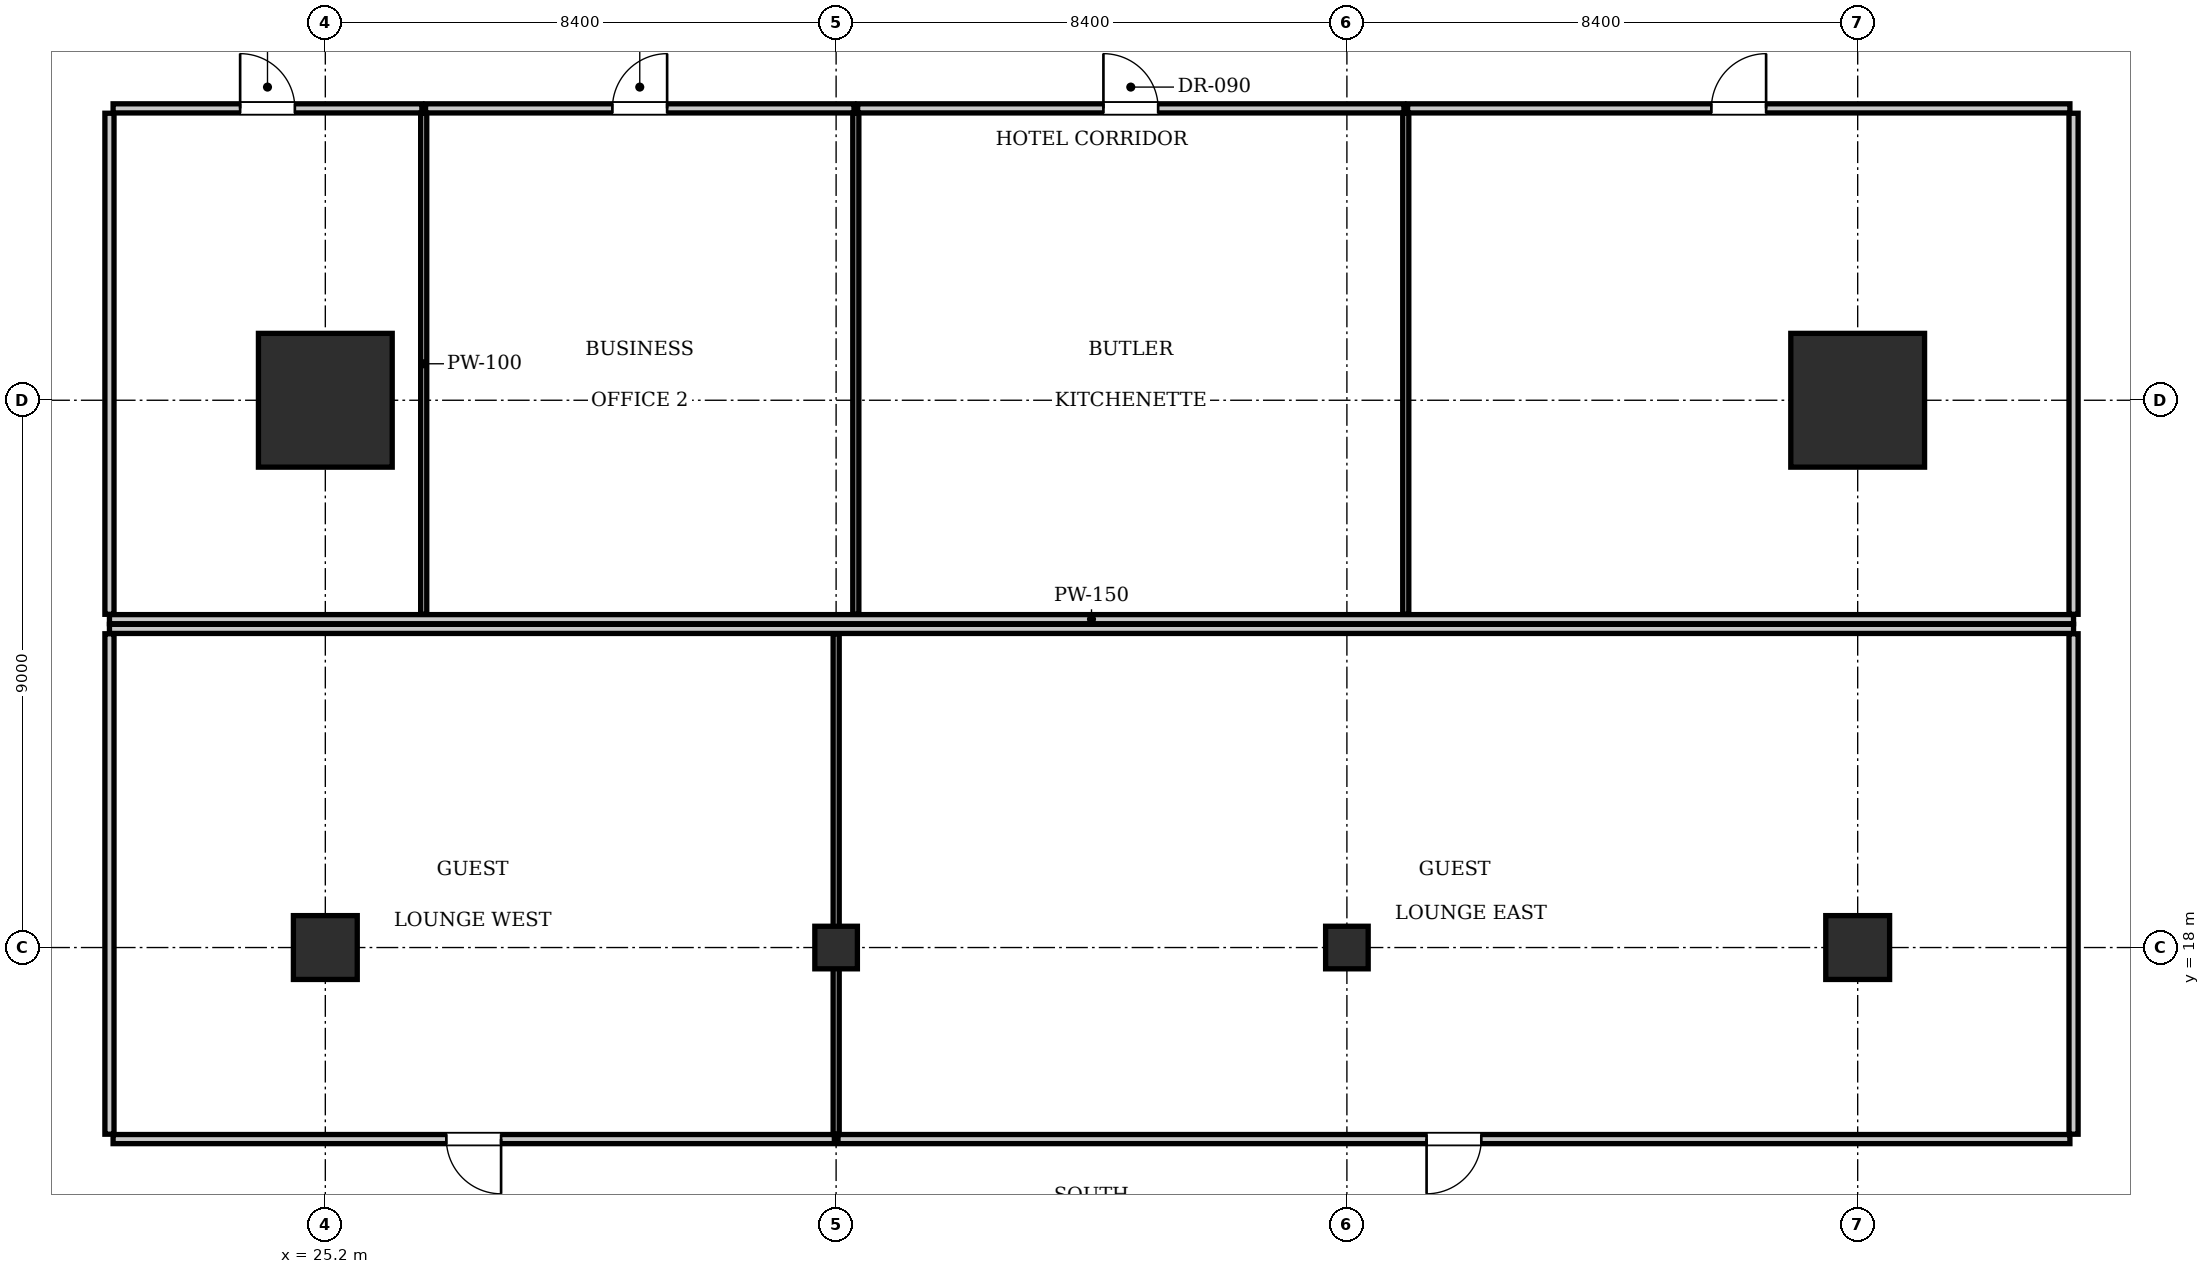
"""IFC4 building model, lengths in metres.
Left out: names, types, materials, properties, quantities, classifications, styles, units other than length and angle.
Written with IfcOpenShell. Run it as: python <this file> out.ifc"""

import sys

from ifc_helpers import new_model, si_unit, direction, frame, frame_2d, origin, origin_2d, place, context, subcontext, project, spatial, rectangle, i_section, extrude, element, fill, save


model = new_model("IFC4")
c1 = context("Model", 3, precision=1e-05, world=origin(), true_north=direction((0.0, 1.0)))
c2 = subcontext(c1, "Body", "Model", "MODEL_VIEW")
j1 = project(units=[si_unit("LENGTHUNIT", "METRE"), si_unit("PLANEANGLEUNIT", "RADIAN")], contexts=[c1])
p1 = place(None, origin())
s1 = spatial("IfcSite", under=j1, at=p1, CompositionType="ELEMENT")
p2 = place(p1, origin())
s2 = spatial("IfcBuilding", under=s1, at=p2, CompositionType="ELEMENT")
p3 = place(p2, frame((0.0, 0.0, 38.5)))
s3 = spatial("IfcBuildingStorey", under=s2, at=p3, CompositionType="ELEMENT", Elevation=38.5)
for number, where, z_axis, x_axis in (
    (1, (25.2, 27.0, 0.0), (0.0, 0.0, 1.0), (1.0, 0.0, 0.0)),
    (2, (50.4, 27.0, 0.0), (0.0, 0.0, 1.0), (1.0, 0.0, 0.0)),
):
    element("IfcColumn", number, at=place(p3, frame(where, z_axis=z_axis, x_axis=x_axis)), inside=s3, PredefinedType="COLUMN", context=c2, shape_type="SweptSolid", body=[
        extrude(rectangle(XDim=2.2, YDim=2.2, at=origin_2d()), origin(), (0.0, 0.0, 1.0), 3.85),
    ])
for number, where, z_axis, x_axis in (
    (3, (25.2, 18.0, 0.0), (0.0, 0.0, 1.0), (1.0, 0.0, 0.0)),
    (4, (50.4, 18.0, 0.0), (0.0, 0.0, 1.0), (1.0, 0.0, 0.0)),
):
    element("IfcColumn", number, at=place(p3, frame(where, z_axis=z_axis, x_axis=x_axis)), inside=s3, PredefinedType="COLUMN", context=c2, shape_type="SweptSolid", body=[
        extrude(rectangle(XDim=1.05, YDim=1.05, at=origin_2d()), origin(), (0.0, 0.0, 1.0), 3.85),
    ])
for number, where, z_axis, x_axis in (
    (5, (33.6, 18.0, 0.0), (0.0, 0.0, 1.0), (1.0, 0.0, 0.0)),
    (6, (42.0, 18.0, 0.0), (0.0, 0.0, 1.0), (1.0, 0.0, 0.0)),
):
    element("IfcColumn", number, at=place(p3, frame(where, z_axis=z_axis, x_axis=x_axis)), inside=s3, PredefinedType="COLUMN", context=c2, shape_type="SweptSolid", body=[
        extrude(i_section(OverallWidth=0.7, OverallDepth=0.7, WebThickness=0.028, FlangeThickness=0.044, at=origin_2d()), origin(), (0.0, 0.0, 1.0), 3.85),
    ])
p4 = place(p3, frame((21.65, 23.4, 0.0), z_axis=(0.0, 0.0, 1.0), x_axis=(1.0, 0.0, 0.0)))
e7 = element("IfcWall", 7, at=p4, inside=s3, PredefinedType="PARTITIONING", context=c2, shape_type="SweptSolid", body=[
    extrude(rectangle(XDim=32.3, YDim=0.15, at=frame_2d((16.15, 0.0))), origin(), (0.0, 0.0, 1.0), 3.61),
])
for number, where, z_axis, x_axis in (
    (8, (21.65, 23.48, 0.0), (0.0, 0.0, 1.0), (0.0, 1.0, 0.0)),
    (9, (53.95, 23.48, 0.0), (0.0, 0.0, 1.0), (0.0, 1.0, 0.0)),
):
    element("IfcWall", number, at=place(p3, frame(where, z_axis=z_axis, x_axis=x_axis)), inside=s3, PredefinedType="PARTITIONING", context=c2, shape_type="SweptSolid", body=[
        extrude(rectangle(XDim=8.24, YDim=0.15, at=frame_2d((4.12, 0.0))), origin(), (0.0, 0.0, 1.0), 3.61),
    ])
p5 = place(p3, frame((21.71, 31.8, 0.0), z_axis=(0.0, 0.0, 1.0), x_axis=(1.0, 0.0, 0.0)))
e10 = element("IfcWall", 10, at=p5, inside=s3, PredefinedType="PARTITIONING", context=c2, shape_type="SweptSolid", body=[
    extrude(rectangle(XDim=5.078, YDim=0.15, at=frame_2d((2.539, 0.0))), origin(), (0.0, 0.0, 1.0), 3.61),
])
p6 = place(p5, frame((2.089, 0.0, 0.0)))
e11 = element("IfcOpeningElement", 11, at=p6, cuts=e10, PredefinedType="OPENING", context=c2, shape_type="SweptSolid", body=[
    extrude(rectangle(XDim=0.9, YDim=2.1, at=frame_2d((0.45, 1.05))), frame((0.0, 0.085, 0.0), z_axis=(0.0, -1.0, 0.0), x_axis=(1.0, 0.0, 0.0)), (0.0, 0.0, 1.0), 0.17),
])
p7 = place(p3, frame((26.818, 23.48, 0.0), z_axis=(0.0, 0.0, 1.0), x_axis=(0.0, 1.0, 0.0)))
e12 = element("IfcWall", 12, at=p7, inside=s3, PredefinedType="PARTITIONING", context=c2, shape_type="SweptSolid", body=[
    extrude(rectangle(XDim=8.24, YDim=0.1, at=frame_2d((4.12, 0.0))), origin(), (0.0, 0.0, 1.0), 3.61),
])
p8 = place(p3, frame((26.848, 31.8, 0.0), z_axis=(0.0, 0.0, 1.0), x_axis=(1.0, 0.0, 0.0)))
e13 = element("IfcWall", 13, at=p8, inside=s3, PredefinedType="PARTITIONING", context=c2, shape_type="SweptSolid", body=[
    extrude(rectangle(XDim=7.046, YDim=0.15, at=frame_2d((3.523, 0.0))), origin(), (0.0, 0.0, 1.0), 3.61),
])
p9 = place(p8, frame((3.073, 0.0, 0.0)))
e14 = element("IfcOpeningElement", 14, at=p9, cuts=e13, PredefinedType="OPENING", context=c2, shape_type="SweptSolid", body=[
    extrude(rectangle(XDim=0.9, YDim=2.1, at=frame_2d((0.45, 1.05))), frame((0.0, 0.085, 0.0), z_axis=(0.0, -1.0, 0.0), x_axis=(1.0, 0.0, 0.0)), (0.0, 0.0, 1.0), 0.17),
])
p10 = place(p3, frame((33.924, 23.48, 0.0), z_axis=(0.0, 0.0, 1.0), x_axis=(0.0, 1.0, 0.0)))
e15 = element("IfcWall", 15, at=p10, inside=s3, PredefinedType="PARTITIONING", context=c2, shape_type="SweptSolid", body=[
    extrude(rectangle(XDim=8.24, YDim=0.1, at=frame_2d((4.12, 0.0))), origin(), (0.0, 0.0, 1.0), 3.61),
])
p11 = place(p3, frame((33.954, 31.8, 0.0), z_axis=(0.0, 0.0, 1.0), x_axis=(1.0, 0.0, 0.0)))
e16 = element("IfcWall", 16, at=p11, inside=s3, PredefinedType="PARTITIONING", context=c2, shape_type="SweptSolid", body=[
    extrude(rectangle(XDim=8.984, YDim=0.15, at=frame_2d((4.492, 0.0))), origin(), (0.0, 0.0, 1.0), 3.61),
])
p12 = place(p11, frame((4.042, 0.0, 0.0)))
e17 = element("IfcOpeningElement", 17, at=p12, cuts=e16, PredefinedType="OPENING", context=c2, shape_type="SweptSolid", body=[
    extrude(rectangle(XDim=0.9, YDim=2.1, at=frame_2d((0.45, 1.05))), frame((0.0, 0.085, 0.0), z_axis=(0.0, -1.0, 0.0), x_axis=(1.0, 0.0, 0.0)), (0.0, 0.0, 1.0), 0.17),
])
p13 = place(p3, frame((42.968, 23.48, 0.0), z_axis=(0.0, 0.0, 1.0), x_axis=(0.0, 1.0, 0.0)))
e18 = element("IfcWall", 18, at=p13, inside=s3, PredefinedType="PARTITIONING", context=c2, shape_type="SweptSolid", body=[
    extrude(rectangle(XDim=8.24, YDim=0.1, at=frame_2d((4.12, 0.0))), origin(), (0.0, 0.0, 1.0), 3.61),
])
p14 = place(p3, frame((42.998, 31.8, 0.0), z_axis=(0.0, 0.0, 1.0), x_axis=(1.0, 0.0, 0.0)))
e19 = element("IfcWall", 19, at=p14, inside=s3, PredefinedType="PARTITIONING", context=c2, shape_type="SweptSolid", body=[
    extrude(rectangle(XDim=10.892, YDim=0.15, at=frame_2d((5.446, 0.0))), origin(), (0.0, 0.0, 1.0), 3.61),
])
p15 = place(p14, frame((4.996, 0.0, 0.0)))
e20 = element("IfcOpeningElement", 20, at=p15, cuts=e19, PredefinedType="OPENING", context=c2, shape_type="SweptSolid", body=[
    extrude(rectangle(XDim=0.9, YDim=2.1, at=frame_2d((0.45, 1.05))), frame((0.0, 0.085, 0.0), z_axis=(0.0, -1.0, 0.0), x_axis=(1.0, 0.0, 0.0)), (0.0, 0.0, 1.0), 0.17),
])
p16 = place(p3, frame((21.65, 23.24, 0.0), z_axis=(0.0, 0.0, 1.0), x_axis=(1.0, 0.0, 0.0)))
e21 = element("IfcWall", 21, at=p16, inside=s3, PredefinedType="PARTITIONING", context=c2, shape_type="SweptSolid", body=[
    extrude(rectangle(XDim=32.3, YDim=0.15, at=frame_2d((16.15, 0.0))), origin(), (0.0, 0.0, 1.0), 3.61),
])
for number, where, z_axis, x_axis in (
    (22, (21.65, 14.93, 0.0), (0.0, 0.0, 1.0), (0.0, 1.0, 0.0)),
    (23, (53.95, 14.93, 0.0), (0.0, 0.0, 1.0), (0.0, 1.0, 0.0)),
):
    element("IfcWall", number, at=place(p3, frame(where, z_axis=z_axis, x_axis=x_axis)), inside=s3, PredefinedType="PARTITIONING", context=c2, shape_type="SweptSolid", body=[
        extrude(rectangle(XDim=8.23, YDim=0.15, at=frame_2d((4.115, 0.0))), origin(), (0.0, 0.0, 1.0), 3.61),
    ])
p17 = place(p3, frame((21.71, 14.85, 0.0), z_axis=(0.0, 0.0, 1.0), x_axis=(1.0, 0.0, 0.0)))
e24 = element("IfcWall", 24, at=p17, inside=s3, PredefinedType="PARTITIONING", context=c2, shape_type="SweptSolid", body=[
    extrude(rectangle(XDim=11.861, YDim=0.15, at=frame_2d((5.931, 0.0))), origin(), (0.0, 0.0, 1.0), 3.61),
])
p18 = place(p17, frame((5.48, 0.0, 0.0)))
e25 = element("IfcOpeningElement", 25, at=p18, cuts=e24, PredefinedType="OPENING", context=c2, shape_type="SweptSolid", body=[
    extrude(rectangle(XDim=0.9, YDim=2.1, at=frame_2d((0.45, 1.05))), frame((0.0, 0.085, 0.0), z_axis=(0.0, -1.0, 0.0), x_axis=(1.0, 0.0, 0.0)), (0.0, 0.0, 1.0), 0.17),
])
p19 = place(p3, frame((33.601, 14.93, 0.0), z_axis=(0.0, 0.0, 1.0), x_axis=(0.0, 1.0, 0.0)))
e26 = element("IfcWall", 26, at=p19, inside=s3, PredefinedType="PARTITIONING", context=c2, shape_type="SweptSolid", body=[
    extrude(rectangle(XDim=8.23, YDim=0.1, at=frame_2d((4.115, 0.0))), origin(), (0.0, 0.0, 1.0), 2.988),
])
p20 = place(p3, frame((33.631, 14.85, 0.0), z_axis=(0.0, 0.0, 1.0), x_axis=(1.0, 0.0, 0.0)))
e27 = element("IfcWall", 27, at=p20, inside=s3, PredefinedType="PARTITIONING", context=c2, shape_type="SweptSolid", body=[
    extrude(rectangle(XDim=20.259, YDim=0.15, at=frame_2d((10.129, 0.0))), origin(), (0.0, 0.0, 1.0), 3.61),
])
p21 = place(p20, frame((9.679, 0.0, 0.0)))
e28 = element("IfcOpeningElement", 28, at=p21, cuts=e27, PredefinedType="OPENING", context=c2, shape_type="SweptSolid", body=[
    extrude(rectangle(XDim=0.9, YDim=2.1, at=frame_2d((0.45, 1.05))), frame((0.0, 0.085, 0.0), z_axis=(0.0, -1.0, 0.0), x_axis=(1.0, 0.0, 0.0)), (0.0, 0.0, 1.0), 0.17),
])
p22 = place(p6, origin())
e29 = element("IfcDoor", 29, at=p22, inside=s3, OperationType="SINGLE_SWING_LEFT", PredefinedType="DOOR", context=c2, shape_type="SweptSolid", body=[
    extrude(rectangle(XDim=0.9, YDim=2.1, at=frame_2d((0.45, 1.05))), frame((0.0, 0.025, 0.0), z_axis=(0.0, -1.0, 0.0), x_axis=(1.0, 0.0, 0.0)), (0.0, 0.0, 1.0), 0.05),
])
fill(e11, e29)
p23 = place(p9, origin())
e30 = element("IfcDoor", 30, at=p23, inside=s3, OperationType="SINGLE_SWING_RIGHT", PredefinedType="DOOR", context=c2, shape_type="SweptSolid", body=[
    extrude(rectangle(XDim=0.9, YDim=2.1, at=frame_2d((0.45, 1.05))), frame((0.0, 0.025, 0.0), z_axis=(0.0, -1.0, 0.0), x_axis=(1.0, 0.0, 0.0)), (0.0, 0.0, 1.0), 0.05),
])
fill(e14, e30)
p24 = place(p12, origin())
e31 = element("IfcDoor", 31, at=p24, inside=s3, OperationType="SINGLE_SWING_LEFT", PredefinedType="DOOR", context=c2, shape_type="SweptSolid", body=[
    extrude(rectangle(XDim=0.9, YDim=2.1, at=frame_2d((0.45, 1.05))), frame((0.0, 0.025, 0.0), z_axis=(0.0, -1.0, 0.0), x_axis=(1.0, 0.0, 0.0)), (0.0, 0.0, 1.0), 0.05),
])
fill(e17, e31)
p25 = place(p15, origin())
e32 = element("IfcDoor", 32, at=p25, inside=s3, OperationType="SINGLE_SWING_RIGHT", PredefinedType="DOOR", context=c2, shape_type="SweptSolid", body=[
    extrude(rectangle(XDim=0.9, YDim=2.1, at=frame_2d((0.45, 1.05))), frame((0.0, 0.025, 0.0), z_axis=(0.0, -1.0, 0.0), x_axis=(1.0, 0.0, 0.0)), (0.0, 0.0, 1.0), 0.05),
])
fill(e20, e32)
p26 = place(p18, frame((0.9, 0.0, 0.0), z_axis=(0.0, 0.0, 1.0), x_axis=(-1.0, 0.0, 0.0)))
e33 = element("IfcDoor", 33, at=p26, inside=s3, OperationType="SINGLE_SWING_LEFT", PredefinedType="DOOR", context=c2, shape_type="SweptSolid", body=[
    extrude(rectangle(XDim=0.9, YDim=2.1, at=frame_2d((0.45, 1.05))), frame((0.0, 0.025, 0.0), z_axis=(0.0, -1.0, 0.0), x_axis=(1.0, 0.0, 0.0)), (0.0, 0.0, 1.0), 0.05),
])
fill(e25, e33)
p27 = place(p21, frame((0.9, 0.0, 0.0), z_axis=(0.0, 0.0, 1.0), x_axis=(-1.0, 0.0, 0.0)))
e34 = element("IfcDoor", 34, at=p27, inside=s3, OperationType="SINGLE_SWING_RIGHT", PredefinedType="DOOR", context=c2, shape_type="SweptSolid", body=[
    extrude(rectangle(XDim=0.9, YDim=2.1, at=frame_2d((0.45, 1.05))), frame((0.0, 0.025, 0.0), z_axis=(0.0, -1.0, 0.0), x_axis=(1.0, 0.0, 0.0)), (0.0, 0.0, 1.0), 0.05),
])
fill(e28, e34)
save(model, sys.argv[1])
